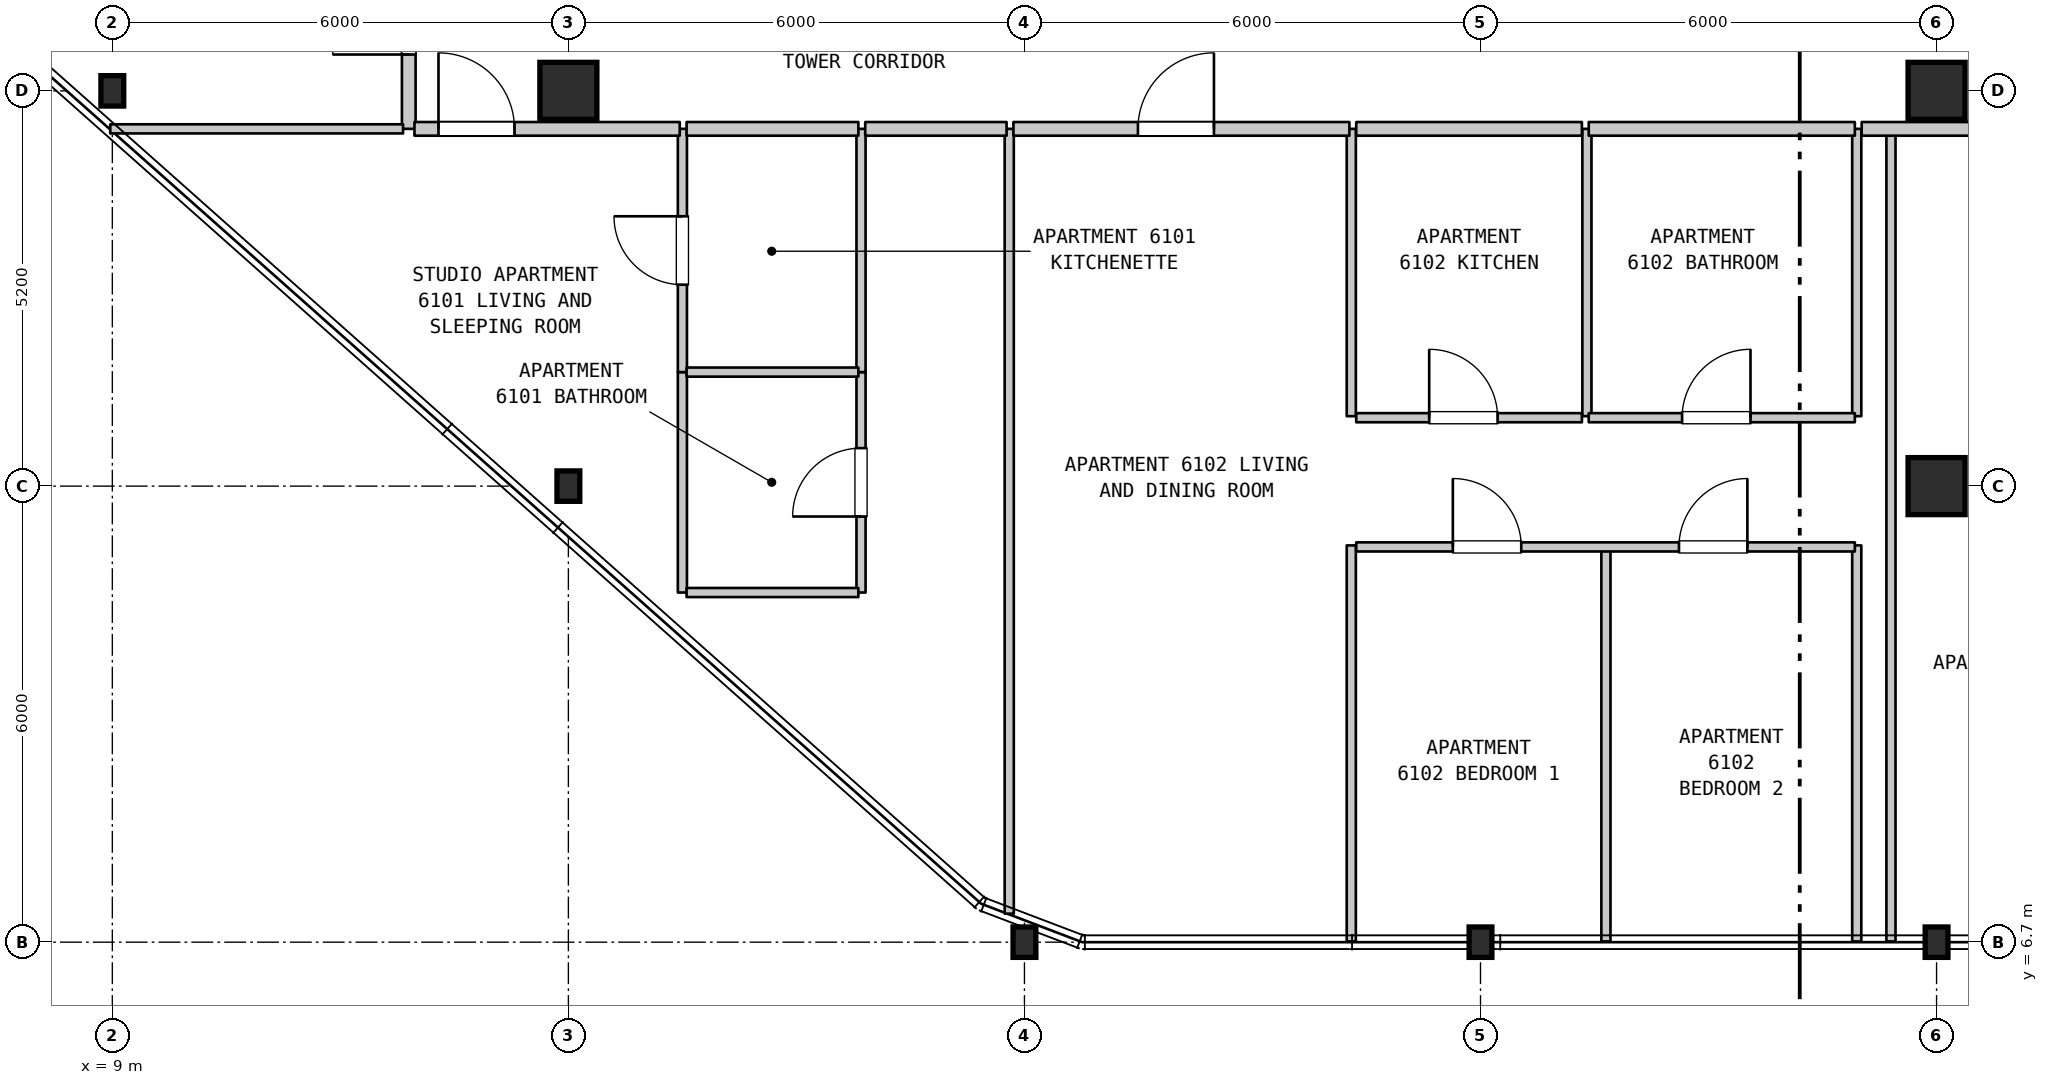
"""IFC4 building model, lengths in metres.
Left out: names, types, materials, properties, quantities, classifications, styles, units other than length and angle.
Written with IfcOpenShell. Run it as: python <this file> out.ifc"""

import sys

from ifc_helpers import new_model, si_unit, direction, frame, frame_2d, origin, origin_2d, place, context, subcontext, project, spatial, rectangle, i_section, extrude, element, fill, save


model = new_model("IFC4")
c1 = context("Model", 3, precision=1e-05, world=origin(), true_north=direction((0.0, 1.0)))
c2 = subcontext(c1, "Body", "Model", "MODEL_VIEW")
j1 = project(units=[si_unit("LENGTHUNIT", "METRE"), si_unit("PLANEANGLEUNIT", "RADIAN")], contexts=[c1])
p1 = place(None, origin())
s1 = spatial("IfcSite", under=j1, at=p1, CompositionType="ELEMENT")
p2 = place(p1, origin())
s2 = spatial("IfcBuilding", under=s1, at=p2, CompositionType="ELEMENT")
p3 = place(p2, frame((0.0, 0.0, 247.3)))
s3 = spatial("IfcBuildingStorey", under=s2, at=p3, CompositionType="ELEMENT", Elevation=247.3)
for number, where, z_axis, x_axis in (
    (1, (9.0, 17.9, 0.0), (0.0, 0.0, 1.0), (1.0, 0.0, 0.0)),
    (2, (15.0, 12.7, 0.0), (0.0, 0.0, 1.0), (1.0, 0.0, 0.0)),
):
    element("IfcColumn", number, at=place(p3, frame(where, z_axis=z_axis, x_axis=x_axis)), inside=s3, PredefinedType="COLUMN", context=c2, shape_type="SweptSolid", body=[
        extrude(i_section(OverallWidth=0.3, OverallDepth=0.4, WebThickness=0.013, FlangeThickness=0.024, FilletRadius=0.027, at=origin_2d()), origin(), (0.0, 0.0, 1.0), 3.7),
    ])
p4 = place(p3, frame((15.0, 17.9, 0.0), z_axis=(0.0, 0.0, 1.0), x_axis=(1.0, 0.0, 0.0)))
e3 = element("IfcColumn", 3, at=p4, inside=s3, PredefinedType="COLUMN", context=c2, shape_type="SweptSolid", body=[
    extrude(rectangle(XDim=0.75, YDim=0.75, at=origin_2d()), origin(), (0.0, 0.0, 1.0), 3.7),
])
for number, where, z_axis, x_axis in (
    (4, (21.0, 6.7, 0.0), (0.0, 0.0, 1.0), (1.0, 0.0, 0.0)),
    (5, (27.0, 6.7, 0.0), (0.0, 0.0, 1.0), (1.0, 0.0, 0.0)),
    (6, (33.0, 6.7, 0.0), (0.0, 0.0, 1.0), (1.0, 0.0, 0.0)),
):
    element("IfcColumn", number, at=place(p3, frame(where, z_axis=z_axis, x_axis=x_axis)), inside=s3, PredefinedType="COLUMN", context=c2, shape_type="SweptSolid", body=[
        extrude(i_section(OverallWidth=0.3, OverallDepth=0.4, WebThickness=0.013, FlangeThickness=0.024, FilletRadius=0.027, at=origin_2d()), origin(), (0.0, 0.0, 1.0), 3.7),
    ])
for number, where, z_axis, x_axis in (
    (7, (33.0, 12.7, 0.0), (0.0, 0.0, 1.0), (1.0, 0.0, 0.0)),
    (8, (33.0, 17.9, 0.0), (0.0, 0.0, 1.0), (1.0, 0.0, 0.0)),
):
    element("IfcColumn", number, at=place(p3, frame(where, z_axis=z_axis, x_axis=x_axis)), inside=s3, PredefinedType="COLUMN", context=c2, shape_type="SweptSolid", body=[
        extrude(rectangle(XDim=0.75, YDim=0.75, at=origin_2d()), origin(), (0.0, 0.0, 1.0), 3.7),
    ])
p5 = place(p3, frame((12.9, 17.4, 0.0), z_axis=(0.0, 0.0, 1.0), x_axis=(0.0, 1.0, 0.0)))
e9 = element("IfcWall", 9, at=p5, inside=s3, PredefinedType="STANDARD", context=c2, shape_type="SweptSolid", body=[
    extrude(rectangle(XDim=3.1, YDim=0.18, at=frame_2d((1.55, 0.0))), origin(), (0.0, 0.0, 1.0), 3.39),
])
p6 = place(p5, frame((0.978, 0.0, 0.0)))
e10 = element("IfcOpeningElement", 10, at=p6, cuts=e9, PredefinedType="OPENING", context=c2, shape_type="SweptSolid", body=[
    extrude(rectangle(XDim=1.0, YDim=2.15, at=frame_2d((0.5, 1.075))), frame((0.0, 0.1, 0.0), z_axis=(0.0, -1.0, 0.0), x_axis=(1.0, 0.0, 0.0)), (0.0, 0.0, 1.0), 0.2),
])
p7 = place(p3, frame((16.5, 11.3, 0.0), z_axis=(0.0, 0.0, 1.0), x_axis=(0.0, 1.0, 0.0)))
e11 = element("IfcWall", 11, at=p7, inside=s3, PredefinedType="PARTITIONING", context=c2, shape_type="SweptSolid", body=[
    extrude(rectangle(XDim=2.9, YDim=0.12, at=frame_2d((1.45, 0.0))), origin(), (0.0, 0.0, 1.0), 3.39),
])
p8 = place(p3, frame((16.5, 14.2, 0.0), z_axis=(0.0, 0.0, 1.0), x_axis=(0.0, 1.0, 0.0)))
e12 = element("IfcWall", 12, at=p8, inside=s3, PredefinedType="PARTITIONING", context=c2, shape_type="SweptSolid", body=[
    extrude(rectangle(XDim=3.2, YDim=0.12, at=frame_2d((1.6, 0.0))), origin(), (0.0, 0.0, 1.0), 3.39),
])
p9 = place(p8, frame((1.15, 0.0, 0.0)))
e13 = element("IfcOpeningElement", 13, at=p9, cuts=e12, PredefinedType="OPENING", context=c2, shape_type="SweptSolid", body=[
    extrude(rectangle(XDim=0.9, YDim=2.15, at=frame_2d((0.45, 1.075))), frame((0.0, 0.07, 0.0), z_axis=(0.0, -1.0, 0.0), x_axis=(1.0, 0.0, 0.0)), (0.0, 0.0, 1.0), 0.14),
])
p10 = place(p3, frame((18.85, 11.3, 0.0), z_axis=(0.0, 0.0, 1.0), x_axis=(0.0, 1.0, 0.0)))
e14 = element("IfcWall", 14, at=p10, inside=s3, PredefinedType="PARTITIONING", context=c2, shape_type="SweptSolid", body=[
    extrude(rectangle(XDim=2.9, YDim=0.12, at=frame_2d((1.45, 0.0))), origin(), (0.0, 0.0, 1.0), 3.39),
])
p11 = place(p10, frame((1.0, 0.0, 0.0)))
e15 = element("IfcOpeningElement", 15, at=p11, cuts=e14, PredefinedType="OPENING", context=c2, shape_type="SweptSolid", body=[
    extrude(rectangle(XDim=0.9, YDim=2.1, at=frame_2d((0.45, 1.05))), frame((0.0, 0.07, 0.0), z_axis=(0.0, -1.0, 0.0), x_axis=(1.0, 0.0, 0.0)), (0.0, 0.0, 1.0), 0.14),
])
p12 = place(p3, frame((18.85, 14.2, 0.0), z_axis=(0.0, 0.0, 1.0), x_axis=(0.0, 1.0, 0.0)))
e16 = element("IfcWall", 16, at=p12, inside=s3, PredefinedType="PARTITIONING", context=c2, shape_type="SweptSolid", body=[
    extrude(rectangle(XDim=3.2, YDim=0.12, at=frame_2d((1.6, 0.0))), origin(), (0.0, 0.0, 1.0), 3.39),
])
p13 = place(p3, frame((20.8, 7.075, 0.0), z_axis=(0.0, 0.0, 1.0), x_axis=(0.0, 1.0, 0.0)))
e17 = element("IfcWall", 17, at=p13, inside=s3, PredefinedType="PARTITIONING", context=c2, shape_type="SweptSolid", body=[
    extrude(rectangle(XDim=10.325, YDim=0.12, at=frame_2d((5.163, 0.0))), origin(), (0.0, 0.0, 1.0), 3.39),
])
p14 = place(p3, frame((25.3, 6.71, 0.0), z_axis=(0.0, 0.0, 1.0), x_axis=(0.0, 1.0, 0.0)))
e18 = element("IfcWall", 18, at=p14, inside=s3, PredefinedType="PARTITIONING", context=c2, shape_type="SweptSolid", body=[
    extrude(rectangle(XDim=5.21, YDim=0.12, at=frame_2d((2.605, 0.0))), origin(), (0.0, 0.0, 1.0), 3.39),
])
for number, where, z_axis, x_axis in (
    (19, (25.3, 13.62, 0.0), (0.0, 0.0, 1.0), (0.0, 1.0, 0.0)),
    (20, (28.4, 13.62, 0.0), (0.0, 0.0, 1.0), (0.0, 1.0, 0.0)),
):
    element("IfcWall", number, at=place(p3, frame(where, z_axis=z_axis, x_axis=x_axis)), inside=s3, PredefinedType="PARTITIONING", context=c2, shape_type="SweptSolid", body=[
        extrude(rectangle(XDim=3.78, YDim=0.12, at=frame_2d((1.89, 0.0))), origin(), (0.0, 0.0, 1.0), 3.39),
    ])
for number, where, z_axis, x_axis in (
    (21, (28.65, 6.71, 0.0), (0.0, 0.0, 1.0), (0.0, 1.0, 0.0)),
    (22, (31.95, 6.71, 0.0), (0.0, 0.0, 1.0), (0.0, 1.0, 0.0)),
):
    element("IfcWall", number, at=place(p3, frame(where, z_axis=z_axis, x_axis=x_axis)), inside=s3, PredefinedType="PARTITIONING", context=c2, shape_type="SweptSolid", body=[
        extrude(rectangle(XDim=5.21, YDim=0.12, at=frame_2d((2.605, 0.0))), origin(), (0.0, 0.0, 1.0), 3.39),
    ])
p15 = place(p3, frame((31.95, 13.62, 0.0), z_axis=(0.0, 0.0, 1.0), x_axis=(0.0, 1.0, 0.0)))
e23 = element("IfcWall", 23, at=p15, inside=s3, PredefinedType="PARTITIONING", context=c2, shape_type="SweptSolid", body=[
    extrude(rectangle(XDim=3.78, YDim=0.12, at=frame_2d((1.89, 0.0))), origin(), (0.0, 0.0, 1.0), 3.39),
])
p16 = place(p3, frame((32.4, 6.71, 0.0), z_axis=(0.0, 0.0, 1.0), x_axis=(0.0, 1.0, 0.0)))
e24 = element("IfcWall", 24, at=p16, inside=s3, PredefinedType="PARTITIONING", context=c2, shape_type="SweptSolid", body=[
    extrude(rectangle(XDim=10.69, YDim=0.12, at=frame_2d((5.345, 0.0))), origin(), (0.0, 0.0, 1.0), 3.39),
])
p17 = place(p3, frame((16.555, 11.3, 0.0), z_axis=(0.0, 0.0, 1.0), x_axis=(1.0, 0.0, 0.0)))
e25 = element("IfcWall", 25, at=p17, inside=s3, PredefinedType="PARTITIONING", context=c2, shape_type="SweptSolid", body=[
    extrude(rectangle(XDim=2.26, YDim=0.12, at=frame_2d((1.13, 0.0))), origin(), (0.0, 0.0, 1.0), 3.39),
])
p18 = place(p3, frame((25.365, 11.9, 0.0), z_axis=(0.0, 0.0, 1.0), x_axis=(1.0, 0.0, 0.0)))
e26 = element("IfcWall", 26, at=p18, inside=s3, PredefinedType="PARTITIONING", context=c2, shape_type="SweptSolid", body=[
    extrude(rectangle(XDim=6.56, YDim=0.12, at=frame_2d((3.28, 0.0))), origin(), (0.0, 0.0, 1.0), 3.39),
])
p19 = place(p18, frame((1.271, 0.0, 0.0)))
e27 = element("IfcOpeningElement", 27, at=p19, cuts=e26, PredefinedType="OPENING", context=c2, shape_type="SweptSolid", body=[
    extrude(rectangle(XDim=0.9, YDim=2.15, at=frame_2d((0.45, 1.075))), frame((0.0, 0.07, 0.0), z_axis=(0.0, -1.0, 0.0), x_axis=(1.0, 0.0, 0.0)), (0.0, 0.0, 1.0), 0.14),
])
p20 = place(p18, frame((4.246, 0.0, 0.0)))
e28 = element("IfcOpeningElement", 28, at=p20, cuts=e26, PredefinedType="OPENING", context=c2, shape_type="SweptSolid", body=[
    extrude(rectangle(XDim=0.9, YDim=2.15, at=frame_2d((0.45, 1.075))), frame((0.0, 0.07, 0.0), z_axis=(0.0, -1.0, 0.0), x_axis=(1.0, 0.0, 0.0)), (0.0, 0.0, 1.0), 0.14),
])
p21 = place(p3, frame((25.365, 13.6, 0.0), z_axis=(0.0, 0.0, 1.0), x_axis=(1.0, 0.0, 0.0)))
e29 = element("IfcWall", 29, at=p21, inside=s3, PredefinedType="PARTITIONING", context=c2, shape_type="SweptSolid", body=[
    extrude(rectangle(XDim=2.969, YDim=0.12, at=frame_2d((1.484, 0.0))), origin(), (0.0, 0.0, 1.0), 3.39),
])
p22 = place(p21, frame((0.96, 0.0, 0.0)))
e30 = element("IfcOpeningElement", 30, at=p22, cuts=e29, PredefinedType="OPENING", context=c2, shape_type="SweptSolid", body=[
    extrude(rectangle(XDim=0.9, YDim=2.15, at=frame_2d((0.45, 1.075))), frame((0.0, 0.07, 0.0), z_axis=(0.0, -1.0, 0.0), x_axis=(1.0, 0.0, 0.0)), (0.0, 0.0, 1.0), 0.14),
])
p23 = place(p3, frame((28.424, 13.6, 0.0), z_axis=(0.0, 0.0, 1.0), x_axis=(1.0, 0.0, 0.0)))
e31 = element("IfcWall", 31, at=p23, inside=s3, PredefinedType="PARTITIONING", context=c2, shape_type="SweptSolid", body=[
    extrude(rectangle(XDim=3.501, YDim=0.12, at=frame_2d((1.75, 0.0))), origin(), (0.0, 0.0, 1.0), 3.39),
])
p24 = place(p23, frame((1.228, 0.0, 0.0)))
e32 = element("IfcOpeningElement", 32, at=p24, cuts=e31, PredefinedType="OPENING", context=c2, shape_type="SweptSolid", body=[
    extrude(rectangle(XDim=0.9, YDim=2.1, at=frame_2d((0.45, 1.05))), frame((0.0, 0.07, 0.0), z_axis=(0.0, -1.0, 0.0), x_axis=(1.0, 0.0, 0.0)), (0.0, 0.0, 1.0), 0.14),
])
p25 = place(p3, frame((16.555, 14.2, 0.0), z_axis=(0.0, 0.0, 1.0), x_axis=(1.0, 0.0, 0.0)))
e33 = element("IfcWall", 33, at=p25, inside=s3, PredefinedType="PARTITIONING", context=c2, shape_type="SweptSolid", body=[
    extrude(rectangle(XDim=2.26, YDim=0.12, at=frame_2d((1.13, 0.0))), origin(), (0.0, 0.0, 1.0), 3.39),
])
p26 = place(p3, frame((8.973, 17.4, 0.0), z_axis=(0.0, 0.0, 1.0), x_axis=(1.0, 0.0, 0.0)))
e34 = element("IfcWall", 34, at=p26, inside=s3, PredefinedType="PARTITIONING", context=c2, shape_type="SweptSolid", body=[
    extrude(rectangle(XDim=3.852, YDim=0.12, at=frame_2d((1.926, 0.0))), origin(), (0.0, 0.0, 1.0), 3.39),
])
p27 = place(p3, frame((12.975, 17.4, 0.0), z_axis=(0.0, 0.0, 1.0), x_axis=(1.0, 0.0, 0.0)))
e35 = element("IfcWall", 35, at=p27, inside=s3, PredefinedType="STANDARD", context=c2, shape_type="SweptSolid", body=[
    extrude(rectangle(XDim=3.49, YDim=0.18, at=frame_2d((1.745, 0.0))), origin(), (0.0, 0.0, 1.0), 3.39),
])
p28 = place(p27, frame((0.316, 0.0, 0.0)))
e36 = element("IfcOpeningElement", 36, at=p28, cuts=e35, PredefinedType="OPENING", context=c2, shape_type="SweptSolid", body=[
    extrude(rectangle(XDim=1.0, YDim=2.15, at=frame_2d((0.5, 1.075))), frame((0.0, 0.1, 0.0), z_axis=(0.0, -1.0, 0.0), x_axis=(1.0, 0.0, 0.0)), (0.0, 0.0, 1.0), 0.2),
])
p29 = place(p3, frame((16.555, 17.4, 0.0), z_axis=(0.0, 0.0, 1.0), x_axis=(1.0, 0.0, 0.0)))
e37 = element("IfcWall", 37, at=p29, inside=s3, PredefinedType="STANDARD", context=c2, shape_type="SweptSolid", body=[
    extrude(rectangle(XDim=2.26, YDim=0.18, at=frame_2d((1.13, 0.0))), origin(), (0.0, 0.0, 1.0), 3.39),
])
p30 = place(p3, frame((18.905, 17.4, 0.0), z_axis=(0.0, 0.0, 1.0), x_axis=(1.0, 0.0, 0.0)))
e38 = element("IfcWall", 38, at=p30, inside=s3, PredefinedType="STANDARD", context=c2, shape_type="SweptSolid", body=[
    extrude(rectangle(XDim=1.86, YDim=0.18, at=frame_2d((0.93, 0.0))), origin(), (0.0, 0.0, 1.0), 3.39),
])
p31 = place(p3, frame((20.855, 17.4, 0.0), z_axis=(0.0, 0.0, 1.0), x_axis=(1.0, 0.0, 0.0)))
e39 = element("IfcWall", 39, at=p31, inside=s3, PredefinedType="STANDARD", context=c2, shape_type="SweptSolid", body=[
    extrude(rectangle(XDim=4.42, YDim=0.18, at=frame_2d((2.21, 0.0))), origin(), (0.0, 0.0, 1.0), 3.39),
])
p32 = place(p31, frame((1.638, 0.0, 0.0)))
e40 = element("IfcOpeningElement", 40, at=p32, cuts=e39, PredefinedType="OPENING", context=c2, shape_type="SweptSolid", body=[
    extrude(rectangle(XDim=1.0, YDim=2.15, at=frame_2d((0.5, 1.075))), frame((0.0, 0.1, 0.0), z_axis=(0.0, -1.0, 0.0), x_axis=(1.0, 0.0, 0.0)), (0.0, 0.0, 1.0), 0.2),
])
p33 = place(p3, frame((25.365, 17.4, 0.0), z_axis=(0.0, 0.0, 1.0), x_axis=(1.0, 0.0, 0.0)))
e41 = element("IfcWall", 41, at=p33, inside=s3, PredefinedType="STANDARD", context=c2, shape_type="SweptSolid", body=[
    extrude(rectangle(XDim=2.969, YDim=0.18, at=frame_2d((1.484, 0.0))), origin(), (0.0, 0.0, 1.0), 3.39),
])
p34 = place(p3, frame((28.424, 17.4, 0.0), z_axis=(0.0, 0.0, 1.0), x_axis=(1.0, 0.0, 0.0)))
e42 = element("IfcWall", 42, at=p34, inside=s3, PredefinedType="STANDARD", context=c2, shape_type="SweptSolid", body=[
    extrude(rectangle(XDim=3.501, YDim=0.18, at=frame_2d((1.75, 0.0))), origin(), (0.0, 0.0, 1.0), 3.39),
])
p35 = place(p3, frame((32.015, 17.4, 0.0), z_axis=(0.0, 0.0, 1.0), x_axis=(1.0, 0.0, 0.0)))
e43 = element("IfcWall", 43, at=p35, inside=s3, PredefinedType="STANDARD", context=c2, shape_type="SweptSolid", body=[
    extrude(rectangle(XDim=4.64, YDim=0.18, at=frame_2d((2.32, 0.0))), origin(), (0.0, 0.0, 1.0), 3.39),
])
p36 = place(p35, frame((2.02, 0.0, 0.0)))
e44 = element("IfcOpeningElement", 44, at=p36, cuts=e43, PredefinedType="OPENING", context=c2, shape_type="SweptSolid", body=[
    extrude(rectangle(XDim=1.0, YDim=2.15, at=frame_2d((0.5, 1.075))), frame((0.0, 0.1, 0.0), z_axis=(0.0, -1.0, 0.0), x_axis=(1.0, 0.0, 0.0)), (0.0, 0.0, 1.0), 0.2),
])
p37 = place(p6, origin())
e45 = element("IfcDoor", 45, at=p37, inside=s3, OperationType="SINGLE_SWING_LEFT", PredefinedType="DOOR", context=c2, shape_type="SweptSolid", body=[
    extrude(rectangle(XDim=1.0, YDim=2.15, at=frame_2d((0.5, 1.075))), frame((0.0, 0.025, 0.0), z_axis=(0.0, -1.0, 0.0), x_axis=(1.0, 0.0, 0.0)), (0.0, 0.0, 1.0), 0.05),
])
fill(e10, e45)
p38 = place(p9, origin())
e46 = element("IfcDoor", 46, at=p38, inside=s3, OperationType="SINGLE_SWING_RIGHT", PredefinedType="DOOR", context=c2, shape_type="SweptSolid", body=[
    extrude(rectangle(XDim=0.9, YDim=2.15, at=frame_2d((0.45, 1.075))), frame((0.0, 0.025, 0.0), z_axis=(0.0, -1.0, 0.0), x_axis=(1.0, 0.0, 0.0)), (0.0, 0.0, 1.0), 0.05),
])
fill(e13, e46)
p39 = place(p11, origin())
e47 = element("IfcDoor", 47, at=p39, inside=s3, OperationType="SINGLE_SWING_LEFT", PredefinedType="DOOR", context=c2, shape_type="SweptSolid", body=[
    extrude(rectangle(XDim=0.9, YDim=2.1, at=frame_2d((0.45, 1.05))), frame((0.0, 0.025, 0.0), z_axis=(0.0, -1.0, 0.0), x_axis=(1.0, 0.0, 0.0)), (0.0, 0.0, 1.0), 0.05),
])
fill(e15, e47)
p40 = place(p19, origin())
e48 = element("IfcDoor", 48, at=p40, inside=s3, OperationType="SINGLE_SWING_LEFT", PredefinedType="DOOR", context=c2, shape_type="SweptSolid", body=[
    extrude(rectangle(XDim=0.9, YDim=2.15, at=frame_2d((0.45, 1.075))), frame((0.0, 0.025, 0.0), z_axis=(0.0, -1.0, 0.0), x_axis=(1.0, 0.0, 0.0)), (0.0, 0.0, 1.0), 0.05),
])
fill(e27, e48)
p41 = place(p20, origin())
e49 = element("IfcDoor", 49, at=p41, inside=s3, OperationType="SINGLE_SWING_RIGHT", PredefinedType="DOOR", context=c2, shape_type="SweptSolid", body=[
    extrude(rectangle(XDim=0.9, YDim=2.15, at=frame_2d((0.45, 1.075))), frame((0.0, 0.025, 0.0), z_axis=(0.0, -1.0, 0.0), x_axis=(1.0, 0.0, 0.0)), (0.0, 0.0, 1.0), 0.05),
])
fill(e28, e49)
p42 = place(p22, origin())
e50 = element("IfcDoor", 50, at=p42, inside=s3, OperationType="SINGLE_SWING_LEFT", PredefinedType="DOOR", context=c2, shape_type="SweptSolid", body=[
    extrude(rectangle(XDim=0.9, YDim=2.15, at=frame_2d((0.45, 1.075))), frame((0.0, 0.025, 0.0), z_axis=(0.0, -1.0, 0.0), x_axis=(1.0, 0.0, 0.0)), (0.0, 0.0, 1.0), 0.05),
])
fill(e30, e50)
p43 = place(p24, origin())
e51 = element("IfcDoor", 51, at=p43, inside=s3, OperationType="SINGLE_SWING_RIGHT", PredefinedType="DOOR", context=c2, shape_type="SweptSolid", body=[
    extrude(rectangle(XDim=0.9, YDim=2.1, at=frame_2d((0.45, 1.05))), frame((0.0, 0.025, 0.0), z_axis=(0.0, -1.0, 0.0), x_axis=(1.0, 0.0, 0.0)), (0.0, 0.0, 1.0), 0.05),
])
fill(e32, e51)
p44 = place(p28, origin())
e52 = element("IfcDoor", 52, at=p44, inside=s3, OperationType="SINGLE_SWING_LEFT", PredefinedType="DOOR", context=c2, shape_type="SweptSolid", body=[
    extrude(rectangle(XDim=1.0, YDim=2.15, at=frame_2d((0.5, 1.075))), frame((0.0, 0.025, 0.0), z_axis=(0.0, -1.0, 0.0), x_axis=(1.0, 0.0, 0.0)), (0.0, 0.0, 1.0), 0.05),
])
fill(e36, e52)
p45 = place(p32, origin())
e53 = element("IfcDoor", 53, at=p45, inside=s3, OperationType="SINGLE_SWING_RIGHT", PredefinedType="DOOR", context=c2, shape_type="SweptSolid", body=[
    extrude(rectangle(XDim=1.0, YDim=2.15, at=frame_2d((0.5, 1.075))), frame((0.0, 0.025, 0.0), z_axis=(0.0, -1.0, 0.0), x_axis=(1.0, 0.0, 0.0)), (0.0, 0.0, 1.0), 0.05),
])
fill(e40, e53)
save(model, sys.argv[1])
